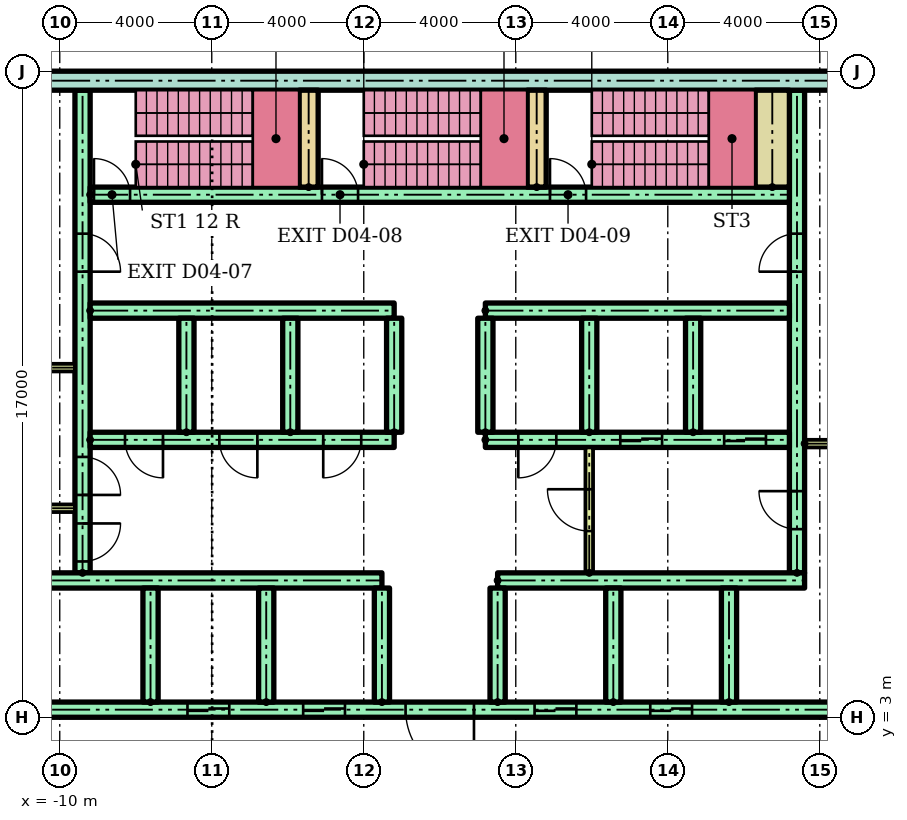
"""IFC4 building model, lengths in metres.
Left out: names, types, materials, properties, quantities, classifications, styles, units other than length and angle.
Written with IfcOpenShell. Run it as: python <this file> out.ifc"""

import sys

from ifc_helpers import new_model, si_unit, direction, frame, frame_2d, origin, place, context, subcontext, project, spatial, rectangle, extrude, element, fill, save


model = new_model("IFC4")
c1 = context("Model", 3, precision=1e-05, world=origin(), true_north=direction((0.0, 1.0)))
c2 = subcontext(c1, "Body", "Model", "MODEL_VIEW")
j1 = project(units=[si_unit("LENGTHUNIT", "METRE"), si_unit("PLANEANGLEUNIT", "RADIAN")], contexts=[c1])
p1 = place(None, origin())
s1 = spatial("IfcSite", under=j1, at=p1, CompositionType="ELEMENT")
p2 = place(p1, origin())
s2 = spatial("IfcBuilding", under=s1, at=p2, CompositionType="ELEMENT")
p3 = place(p2, frame((0.0, 0.0, 18.0)))
s3 = spatial("IfcBuildingStorey", under=s2, at=p3, CompositionType="ELEMENT", Elevation=18.0)
p4 = place(p3, frame((-13.5, 19.75, 0.0)))
e1 = element("IfcWall", 1, at=p4, inside=s3, PredefinedType="SHEAR", context=c2, shape_type="SweptSolid", body=[
    extrude(rectangle(XDim=27.0, YDim=0.5, at=frame_2d((13.5, 0.0))), origin(), (0.0, 0.0, 1.0), 3.7),
])
p5 = place(p3, frame((-9.4, 6.8, 0.0), z_axis=(0.0, 0.0, 1.0), x_axis=(0.0, 1.0, 0.0)))
e2 = element("IfcWall", 2, at=p5, inside=s3, PredefinedType="SHEAR", context=c2, shape_type="SweptSolid", body=[
    extrude(rectangle(XDim=12.7, YDim=0.4, at=frame_2d((6.35, 0.0))), origin(), (0.0, 0.0, 1.0), 3.7),
])
p6 = place(p5, frame((0.3, 0.0, 0.0)))
e3 = element("IfcOpeningElement", 3, at=p6, cuts=e2, PredefinedType="OPENING", context=c2, shape_type="SweptSolid", body=[
    extrude(rectangle(XDim=1.0, YDim=2.1, at=frame_2d((0.5, 1.05))), frame((0.0, 0.21, 0.0), z_axis=(0.0, -1.0, 0.0), x_axis=(1.0, 0.0, 0.0)), (0.0, 0.0, 1.0), 0.42),
])
p7 = place(p5, frame((2.05, 0.0, 0.0)))
e4 = element("IfcOpeningElement", 4, at=p7, cuts=e2, PredefinedType="OPENING", context=c2, shape_type="SweptSolid", body=[
    extrude(rectangle(XDim=1.0, YDim=2.1, at=frame_2d((0.5, 1.05))), frame((0.0, 0.21, 0.0), z_axis=(0.0, -1.0, 0.0), x_axis=(1.0, 0.0, 0.0)), (0.0, 0.0, 1.0), 0.42),
])
p8 = place(p5, frame((7.925, 0.0, 0.0)))
e5 = element("IfcOpeningElement", 5, at=p8, cuts=e2, PredefinedType="OPENING", context=c2, shape_type="SweptSolid", body=[
    extrude(rectangle(XDim=1.0, YDim=2.1, at=frame_2d((0.5, 1.05))), frame((0.0, 0.21, 0.0), z_axis=(0.0, -1.0, 0.0), x_axis=(1.0, 0.0, 0.0)), (0.0, 0.0, 1.0), 0.42),
])
p9 = place(p3, frame((9.4, 6.8, 0.0), z_axis=(0.0, 0.0, 1.0), x_axis=(0.0, 1.0, 0.0)))
e6 = element("IfcWall", 6, at=p9, inside=s3, PredefinedType="SHEAR", context=c2, shape_type="SweptSolid", body=[
    extrude(rectangle(XDim=12.7, YDim=0.4, at=frame_2d((6.35, 0.0))), origin(), (0.0, 0.0, 1.0), 3.7),
])
p10 = place(p9, frame((1.15, 0.0, 0.0)))
e7 = element("IfcOpeningElement", 7, at=p10, cuts=e6, PredefinedType="OPENING", context=c2, shape_type="SweptSolid", body=[
    extrude(rectangle(XDim=1.0, YDim=2.1, at=frame_2d((0.5, 1.05))), frame((0.0, 0.21, 0.0), z_axis=(0.0, -1.0, 0.0), x_axis=(1.0, 0.0, 0.0)), (0.0, 0.0, 1.0), 0.42),
])
p11 = place(p9, frame((7.925, 0.0, 0.0)))
e8 = element("IfcOpeningElement", 8, at=p11, cuts=e6, PredefinedType="OPENING", context=c2, shape_type="SweptSolid", body=[
    extrude(rectangle(XDim=1.0, YDim=2.1, at=frame_2d((0.5, 1.05))), frame((0.0, 0.21, 0.0), z_axis=(0.0, -1.0, 0.0), x_axis=(1.0, 0.0, 0.0)), (0.0, 0.0, 1.0), 0.42),
])
p12 = place(p3, frame((-13.5, 3.2, 0.0)))
e9 = element("IfcWall", 9, at=p12, inside=s3, PredefinedType="SHEAR", context=c2, shape_type="SweptSolid", body=[
    extrude(rectangle(XDim=27.0, YDim=0.4, at=frame_2d((13.5, 0.0))), origin(), (0.0, 0.0, 1.0), 3.7),
])
p13 = place(p12, frame((6.861, 0.0, 0.0)))
e10 = element("IfcOpeningElement", 10, at=p13, cuts=e9, PredefinedType="OPENING", context=c2, shape_type="SweptSolid", body=[
    extrude(rectangle(XDim=1.1, YDim=2.1, at=frame_2d((0.55, 1.05))), frame((0.0, 0.21, 0.0), z_axis=(0.0, -1.0, 0.0), x_axis=(1.0, 0.0, 0.0)), (0.0, 0.0, 1.0), 0.42),
])
p14 = place(p12, frame((9.906, 0.0, 0.0)))
e11 = element("IfcOpeningElement", 11, at=p14, cuts=e9, PredefinedType="OPENING", context=c2, shape_type="SweptSolid", body=[
    extrude(rectangle(XDim=1.1, YDim=2.1, at=frame_2d((0.55, 1.05))), frame((0.0, 0.21, 0.0), z_axis=(0.0, -1.0, 0.0), x_axis=(1.0, 0.0, 0.0)), (0.0, 0.0, 1.0), 0.42),
])
p15 = place(p12, frame((15.994, 0.0, 0.0)))
e12 = element("IfcOpeningElement", 12, at=p15, cuts=e9, PredefinedType="OPENING", context=c2, shape_type="SweptSolid", body=[
    extrude(rectangle(XDim=1.1, YDim=2.1, at=frame_2d((0.55, 1.05))), frame((0.0, 0.21, 0.0), z_axis=(0.0, -1.0, 0.0), x_axis=(1.0, 0.0, 0.0)), (0.0, 0.0, 1.0), 0.42),
])
p16 = place(p12, frame((19.039, 0.0, 0.0)))
e13 = element("IfcOpeningElement", 13, at=p16, cuts=e9, PredefinedType="OPENING", context=c2, shape_type="SweptSolid", body=[
    extrude(rectangle(XDim=1.1, YDim=2.1, at=frame_2d((0.55, 1.05))), frame((0.0, 0.21, 0.0), z_axis=(0.0, -1.0, 0.0), x_axis=(1.0, 0.0, 0.0)), (0.0, 0.0, 1.0), 0.42),
])
p17 = place(p12, frame((12.6, 0.0, 0.0)))
e14 = element("IfcOpeningElement", 14, at=p17, cuts=e9, PredefinedType="OPENING", context=c2, shape_type="SweptSolid", body=[
    extrude(rectangle(XDim=1.8, YDim=2.1, at=frame_2d((0.9, 1.05))), frame((0.0, 0.21, 0.0), z_axis=(0.0, -1.0, 0.0), x_axis=(1.0, 0.0, 0.0)), (0.0, 0.0, 1.0), 0.42),
])
p18 = place(p3, frame((-13.5, 6.6, 0.0)))
e15 = element("IfcWall", 15, at=p18, inside=s3, PredefinedType="SHEAR", context=c2, shape_type="SweptSolid", body=[
    extrude(rectangle(XDim=11.978, YDim=0.4, at=frame_2d((5.989, 0.0))), origin(), (0.0, 0.0, 1.0), 3.7),
])
p19 = place(p3, frame((1.522, 6.6, 0.0)))
e16 = element("IfcWall", 16, at=p19, inside=s3, PredefinedType="SHEAR", context=c2, shape_type="SweptSolid", body=[
    extrude(rectangle(XDim=8.078, YDim=0.4, at=frame_2d((4.039, 0.0))), origin(), (0.0, 0.0, 1.0), 3.7),
])
for number, where, z_axis, x_axis in (
    (17, (-7.611, 3.4, 0.0), (0.0, 0.0, 1.0), (0.0, 1.0, 0.0)),
    (18, (-4.567, 3.4, 0.0), (0.0, 0.0, 1.0), (0.0, 1.0, 0.0)),
    (19, (-1.522, 3.4, 0.0), (0.0, 0.0, 1.0), (0.0, 1.0, 0.0)),
    (20, (1.522, 3.4, 0.0), (0.0, 0.0, 1.0), (0.0, 1.0, 0.0)),
    (21, (4.567, 3.4, 0.0), (0.0, 0.0, 1.0), (0.0, 1.0, 0.0)),
    (22, (7.611, 3.4, 0.0), (0.0, 0.0, 1.0), (0.0, 1.0, 0.0)),
):
    element("IfcWall", number, at=place(p3, frame(where, z_axis=z_axis, x_axis=x_axis)), inside=s3, PredefinedType="SHEAR", context=c2, shape_type="SweptSolid", body=[
        extrude(rectangle(XDim=3.0, YDim=0.4, at=frame_2d((1.5, 0.0))), origin(), (0.0, 0.0, 1.0), 3.7),
    ])
p20 = place(p3, frame((-9.2, 10.3, 0.0)))
e23 = element("IfcWall", 23, at=p20, inside=s3, PredefinedType="SHEAR", context=c2, shape_type="SweptSolid", body=[
    extrude(rectangle(XDim=8.0, YDim=0.4, at=frame_2d((4.0, 0.0))), origin(), (0.0, 0.0, 1.0), 3.7),
])
p21 = place(p20, frame((0.917, 0.0, 0.0)))
e24 = element("IfcOpeningElement", 24, at=p21, cuts=e23, PredefinedType="OPENING", context=c2, shape_type="SweptSolid", body=[
    extrude(rectangle(XDim=1.0, YDim=2.1, at=frame_2d((0.5, 1.05))), frame((0.0, 0.21, 0.0), z_axis=(0.0, -1.0, 0.0), x_axis=(1.0, 0.0, 0.0)), (0.0, 0.0, 1.0), 0.42),
])
p22 = place(p20, frame((3.4, 0.0, 0.0)))
e25 = element("IfcOpeningElement", 25, at=p22, cuts=e23, PredefinedType="OPENING", context=c2, shape_type="SweptSolid", body=[
    extrude(rectangle(XDim=1.0, YDim=2.1, at=frame_2d((0.5, 1.05))), frame((0.0, 0.21, 0.0), z_axis=(0.0, -1.0, 0.0), x_axis=(1.0, 0.0, 0.0)), (0.0, 0.0, 1.0), 0.42),
])
p23 = place(p20, frame((6.133, 0.0, 0.0)))
e26 = element("IfcOpeningElement", 26, at=p23, cuts=e23, PredefinedType="OPENING", context=c2, shape_type="SweptSolid", body=[
    extrude(rectangle(XDim=1.0, YDim=2.1, at=frame_2d((0.5, 1.05))), frame((0.0, 0.21, 0.0), z_axis=(0.0, -1.0, 0.0), x_axis=(1.0, 0.0, 0.0)), (0.0, 0.0, 1.0), 0.42),
])
p24 = place(p3, frame((-9.2, 13.7, 0.0)))
e27 = element("IfcWall", 27, at=p24, inside=s3, PredefinedType="SHEAR", context=c2, shape_type="SweptSolid", body=[
    extrude(rectangle(XDim=8.0, YDim=0.4, at=frame_2d((4.0, 0.0))), origin(), (0.0, 0.0, 1.0), 3.7),
])
p25 = place(p3, frame((1.2, 10.3, 0.0)))
e28 = element("IfcWall", 28, at=p25, inside=s3, PredefinedType="SHEAR", context=c2, shape_type="SweptSolid", body=[
    extrude(rectangle(XDim=8.0, YDim=0.4, at=frame_2d((4.0, 0.0))), origin(), (0.0, 0.0, 1.0), 3.7),
])
p26 = place(p25, frame((3.55, 0.0, 0.0)))
e29 = element("IfcOpeningElement", 29, at=p26, cuts=e28, PredefinedType="OPENING", context=c2, shape_type="SweptSolid", body=[
    extrude(rectangle(XDim=1.1, YDim=2.1, at=frame_2d((0.55, 1.05))), frame((0.0, 0.21, 0.0), z_axis=(0.0, -1.0, 0.0), x_axis=(1.0, 0.0, 0.0)), (0.0, 0.0, 1.0), 0.42),
])
p27 = place(p25, frame((6.283, 0.0, 0.0)))
e30 = element("IfcOpeningElement", 30, at=p27, cuts=e28, PredefinedType="OPENING", context=c2, shape_type="SweptSolid", body=[
    extrude(rectangle(XDim=1.1, YDim=2.1, at=frame_2d((0.55, 1.05))), frame((0.0, 0.21, 0.0), z_axis=(0.0, -1.0, 0.0), x_axis=(1.0, 0.0, 0.0)), (0.0, 0.0, 1.0), 0.42),
])
p28 = place(p25, frame((0.867, 0.0, 0.0)))
e31 = element("IfcOpeningElement", 31, at=p28, cuts=e28, PredefinedType="OPENING", context=c2, shape_type="SweptSolid", body=[
    extrude(rectangle(XDim=1.0, YDim=2.1, at=frame_2d((0.5, 1.05))), frame((0.0, 0.21, 0.0), z_axis=(0.0, -1.0, 0.0), x_axis=(1.0, 0.0, 0.0)), (0.0, 0.0, 1.0), 0.42),
])
p29 = place(p3, frame((1.2, 13.7, 0.0)))
e32 = element("IfcWall", 32, at=p29, inside=s3, PredefinedType="SHEAR", context=c2, shape_type="SweptSolid", body=[
    extrude(rectangle(XDim=8.0, YDim=0.4, at=frame_2d((4.0, 0.0))), origin(), (0.0, 0.0, 1.0), 3.7),
])
for number, where, z_axis, x_axis in (
    (33, (-6.667, 10.5, 0.0), (0.0, 0.0, 1.0), (0.0, 1.0, 0.0)),
    (34, (-3.933, 10.5, 0.0), (0.0, 0.0, 1.0), (0.0, 1.0, 0.0)),
    (35, (-1.2, 10.5, 0.0), (0.0, 0.0, 1.0), (0.0, 1.0, 0.0)),
    (36, (1.2, 10.5, 0.0), (0.0, 0.0, 1.0), (0.0, 1.0, 0.0)),
    (37, (3.933, 10.5, 0.0), (0.0, 0.0, 1.0), (0.0, 1.0, 0.0)),
    (38, (6.667, 10.5, 0.0), (0.0, 0.0, 1.0), (0.0, 1.0, 0.0)),
):
    element("IfcWall", number, at=place(p3, frame(where, z_axis=z_axis, x_axis=x_axis)), inside=s3, PredefinedType="SHEAR", context=c2, shape_type="SweptSolid", body=[
        extrude(rectangle(XDim=3.0, YDim=0.4, at=frame_2d((1.5, 0.0))), origin(), (0.0, 0.0, 1.0), 3.7),
    ])
p30 = place(p3, frame((3.933, 6.8, 0.0), z_axis=(0.0, 0.0, 1.0), x_axis=(0.0, 1.0, 0.0)))
e39 = element("IfcWall", 39, at=p30, inside=s3, PredefinedType="PARTITIONING", context=c2, shape_type="SweptSolid", body=[
    extrude(rectangle(XDim=3.3, YDim=0.2, at=frame_2d((1.65, 0.0))), origin(), (0.0, 0.0, 1.0), 3.7),
])
p31 = place(p30, frame((1.1, 0.0, 0.0)))
e40 = element("IfcOpeningElement", 40, at=p31, cuts=e39, PredefinedType="OPENING", context=c2, shape_type="SweptSolid", body=[
    extrude(rectangle(XDim=1.1, YDim=2.1, at=frame_2d((0.55, 1.05))), frame((0.0, 0.11, 0.0), z_axis=(0.0, -1.0, 0.0), x_axis=(1.0, 0.0, 0.0)), (0.0, 0.0, 1.0), 0.22),
])
p32 = place(p3, frame((-9.2, 16.75, 0.0)))
e41 = element("IfcWall", 41, at=p32, inside=s3, PredefinedType="SHEAR", context=c2, shape_type="SweptSolid", body=[
    extrude(rectangle(XDim=18.4, YDim=0.4, at=frame_2d((9.2, 0.0))), origin(), (0.0, 0.0, 1.0), 3.7),
])
p33 = place(p32, frame((0.1, 0.0, 0.0)))
e42 = element("IfcOpeningElement", 42, at=p33, cuts=e41, PredefinedType="OPENING", context=c2, shape_type="SweptSolid", body=[
    extrude(rectangle(XDim=0.95, YDim=2.1, at=frame_2d((0.475, 1.05))), frame((0.0, 0.21, 0.0), z_axis=(0.0, -1.0, 0.0), x_axis=(1.0, 0.0, 0.0)), (0.0, 0.0, 1.0), 0.42),
])
p34 = place(p32, frame((6.1, 0.0, 0.0)))
e43 = element("IfcOpeningElement", 43, at=p34, cuts=e41, PredefinedType="OPENING", context=c2, shape_type="SweptSolid", body=[
    extrude(rectangle(XDim=0.95, YDim=2.1, at=frame_2d((0.475, 1.05))), frame((0.0, 0.21, 0.0), z_axis=(0.0, -1.0, 0.0), x_axis=(1.0, 0.0, 0.0)), (0.0, 0.0, 1.0), 0.42),
])
p35 = place(p32, frame((12.1, 0.0, 0.0)))
e44 = element("IfcOpeningElement", 44, at=p35, cuts=e41, PredefinedType="OPENING", context=c2, shape_type="SweptSolid", body=[
    extrude(rectangle(XDim=0.95, YDim=2.1, at=frame_2d((0.475, 1.05))), frame((0.0, 0.21, 0.0), z_axis=(0.0, -1.0, 0.0), x_axis=(1.0, 0.0, 0.0)), (0.0, 0.0, 1.0), 0.42),
])
for number, where, z_axis, x_axis in (
    (45, (-3.45, 16.95, 0.0), (0.0, 0.0, 1.0), (0.0, 1.0, 0.0)),
    (46, (2.55, 16.95, 0.0), (0.0, 0.0, 1.0), (0.0, 1.0, 0.0)),
):
    element("IfcWall", number, at=place(p3, frame(where, z_axis=z_axis, x_axis=x_axis)), inside=s3, PredefinedType="SHEAR", context=c2, shape_type="SweptSolid", body=[
        extrude(rectangle(XDim=2.55, YDim=0.5, at=frame_2d((1.275, 0.0))), origin(), (0.0, 0.0, 1.0), 3.7),
    ])
p36 = place(p3, frame((8.75, 16.95, 0.0), z_axis=(0.0, 0.0, 1.0), x_axis=(0.0, 1.0, 0.0)))
e47 = element("IfcWall", 47, at=p36, inside=s3, PredefinedType="SHEAR", context=c2, shape_type="SweptSolid", body=[
    extrude(rectangle(XDim=2.55, YDim=0.9, at=frame_2d((1.275, 0.0))), origin(), (0.0, 0.0, 1.0), 3.7),
])
for number, where in (
    (48, (-13.5, 8.5, 0.0)),
    (49, (-13.5, 12.2, 0.0)),
    (50, (9.6, 10.2, 0.0)),
):
    element("IfcWall", number, at=place(p3, frame(where)), inside=s3, PredefinedType="PARTITIONING", context=c2, shape_type="SweptSolid", body=[
        extrude(rectangle(XDim=3.9, YDim=0.2, at=frame_2d((1.95, 0.0))), origin(), (0.0, 0.0, 1.0), 3.7),
    ])
p37 = place(p13, origin())
e51 = element("IfcDoor", 51, at=p37, inside=s3, OperationType="SLIDING_TO_LEFT", PredefinedType="DOOR", context=c2, shape_type="SweptSolid", body=[
    extrude(rectangle(XDim=1.1, YDim=2.1, at=frame_2d((0.55, 1.05))), frame((0.0, 0.025, 0.0), z_axis=(0.0, -1.0, 0.0), x_axis=(1.0, 0.0, 0.0)), (0.0, 0.0, 1.0), 0.05),
])
fill(e10, e51)
p38 = place(p14, origin())
e52 = element("IfcDoor", 52, at=p38, inside=s3, OperationType="SLIDING_TO_LEFT", PredefinedType="DOOR", context=c2, shape_type="SweptSolid", body=[
    extrude(rectangle(XDim=1.1, YDim=2.1, at=frame_2d((0.55, 1.05))), frame((0.0, 0.025, 0.0), z_axis=(0.0, -1.0, 0.0), x_axis=(1.0, 0.0, 0.0)), (0.0, 0.0, 1.0), 0.05),
])
fill(e11, e52)
p39 = place(p15, origin())
e53 = element("IfcDoor", 53, at=p39, inside=s3, OperationType="SLIDING_TO_LEFT", PredefinedType="DOOR", context=c2, shape_type="SweptSolid", body=[
    extrude(rectangle(XDim=1.1, YDim=2.1, at=frame_2d((0.55, 1.05))), frame((0.0, 0.025, 0.0), z_axis=(0.0, -1.0, 0.0), x_axis=(1.0, 0.0, 0.0)), (0.0, 0.0, 1.0), 0.05),
])
fill(e12, e53)
p40 = place(p16, origin())
e54 = element("IfcDoor", 54, at=p40, inside=s3, OperationType="SLIDING_TO_LEFT", PredefinedType="DOOR", context=c2, shape_type="SweptSolid", body=[
    extrude(rectangle(XDim=1.1, YDim=2.1, at=frame_2d((0.55, 1.05))), frame((0.0, 0.025, 0.0), z_axis=(0.0, -1.0, 0.0), x_axis=(1.0, 0.0, 0.0)), (0.0, 0.0, 1.0), 0.05),
])
fill(e13, e54)
p41 = place(p17, frame((1.8, 0.0, 0.0), z_axis=(0.0, 0.0, 1.0), x_axis=(-1.0, 0.0, 0.0)))
e55 = element("IfcDoor", 55, at=p41, inside=s3, OperationType="DOUBLE_DOOR_SINGLE_SWING", PredefinedType="DOOR", context=c2, shape_type="SweptSolid", body=[
    extrude(rectangle(XDim=1.8, YDim=2.1, at=frame_2d((0.9, 1.05))), frame((0.0, 0.025, 0.0), z_axis=(0.0, -1.0, 0.0), x_axis=(1.0, 0.0, 0.0)), (0.0, 0.0, 1.0), 0.05),
])
fill(e14, e55)
p42 = place(p26, origin())
e56 = element("IfcDoor", 56, at=p42, inside=s3, OperationType="SLIDING_TO_LEFT", PredefinedType="DOOR", context=c2, shape_type="SweptSolid", body=[
    extrude(rectangle(XDim=1.1, YDim=2.1, at=frame_2d((0.55, 1.05))), frame((0.0, 0.025, 0.0), z_axis=(0.0, -1.0, 0.0), x_axis=(1.0, 0.0, 0.0)), (0.0, 0.0, 1.0), 0.05),
])
fill(e29, e56)
p43 = place(p27, origin())
e57 = element("IfcDoor", 57, at=p43, inside=s3, OperationType="SLIDING_TO_LEFT", PredefinedType="DOOR", context=c2, shape_type="SweptSolid", body=[
    extrude(rectangle(XDim=1.1, YDim=2.1, at=frame_2d((0.55, 1.05))), frame((0.0, 0.025, 0.0), z_axis=(0.0, -1.0, 0.0), x_axis=(1.0, 0.0, 0.0)), (0.0, 0.0, 1.0), 0.05),
])
fill(e30, e57)
p44 = place(p21, frame((1.0, 0.0, 0.0), z_axis=(0.0, 0.0, 1.0), x_axis=(-1.0, 0.0, 0.0)))
e58 = element("IfcDoor", 58, at=p44, inside=s3, OperationType="SINGLE_SWING_RIGHT", PredefinedType="DOOR", context=c2, shape_type="SweptSolid", body=[
    extrude(rectangle(XDim=1.0, YDim=2.1, at=frame_2d((0.5, 1.05))), frame((0.0, 0.025, 0.0), z_axis=(0.0, -1.0, 0.0), x_axis=(1.0, 0.0, 0.0)), (0.0, 0.0, 1.0), 0.05),
])
fill(e24, e58)
p45 = place(p22, frame((1.0, 0.0, 0.0), z_axis=(0.0, 0.0, 1.0), x_axis=(-1.0, 0.0, 0.0)))
e59 = element("IfcDoor", 59, at=p45, inside=s3, OperationType="SINGLE_SWING_RIGHT", PredefinedType="DOOR", context=c2, shape_type="SweptSolid", body=[
    extrude(rectangle(XDim=1.0, YDim=2.1, at=frame_2d((0.5, 1.05))), frame((0.0, 0.025, 0.0), z_axis=(0.0, -1.0, 0.0), x_axis=(1.0, 0.0, 0.0)), (0.0, 0.0, 1.0), 0.05),
])
fill(e25, e59)
p46 = place(p23, frame((1.0, 0.0, 0.0), z_axis=(0.0, 0.0, 1.0), x_axis=(-1.0, 0.0, 0.0)))
e60 = element("IfcDoor", 60, at=p46, inside=s3, OperationType="SINGLE_SWING_LEFT", PredefinedType="DOOR", context=c2, shape_type="SweptSolid", body=[
    extrude(rectangle(XDim=1.0, YDim=2.1, at=frame_2d((0.5, 1.05))), frame((0.0, 0.025, 0.0), z_axis=(0.0, -1.0, 0.0), x_axis=(1.0, 0.0, 0.0)), (0.0, 0.0, 1.0), 0.05),
])
fill(e26, e60)
p47 = place(p28, frame((1.0, 0.0, 0.0), z_axis=(0.0, 0.0, 1.0), x_axis=(-1.0, 0.0, 0.0)))
e61 = element("IfcDoor", 61, at=p47, inside=s3, OperationType="SINGLE_SWING_LEFT", PredefinedType="DOOR", context=c2, shape_type="SweptSolid", body=[
    extrude(rectangle(XDim=1.0, YDim=2.1, at=frame_2d((0.5, 1.05))), frame((0.0, 0.025, 0.0), z_axis=(0.0, -1.0, 0.0), x_axis=(1.0, 0.0, 0.0)), (0.0, 0.0, 1.0), 0.05),
])
fill(e31, e61)
p48 = place(p31, origin())
e62 = element("IfcDoor", 62, at=p48, inside=s3, OperationType="SINGLE_SWING_RIGHT", PredefinedType="DOOR", context=c2, shape_type="SweptSolid", body=[
    extrude(rectangle(XDim=1.1, YDim=2.1, at=frame_2d((0.55, 1.05))), frame((0.0, 0.025, 0.0), z_axis=(0.0, -1.0, 0.0), x_axis=(1.0, 0.0, 0.0)), (0.0, 0.0, 1.0), 0.05),
])
fill(e40, e62)
p49 = place(p33, origin())
e63 = element("IfcDoor", 63, at=p49, inside=s3, OperationType="SINGLE_SWING_LEFT", PredefinedType="DOOR", context=c2, shape_type="SweptSolid", body=[
    extrude(rectangle(XDim=0.95, YDim=2.1, at=frame_2d((0.475, 1.05))), frame((0.0, 0.025, 0.0), z_axis=(0.0, -1.0, 0.0), x_axis=(1.0, 0.0, 0.0)), (0.0, 0.0, 1.0), 0.05),
])
fill(e42, e63)
p50 = place(p34, origin())
e64 = element("IfcDoor", 64, at=p50, inside=s3, OperationType="SINGLE_SWING_LEFT", PredefinedType="DOOR", context=c2, shape_type="SweptSolid", body=[
    extrude(rectangle(XDim=0.95, YDim=2.1, at=frame_2d((0.475, 1.05))), frame((0.0, 0.025, 0.0), z_axis=(0.0, -1.0, 0.0), x_axis=(1.0, 0.0, 0.0)), (0.0, 0.0, 1.0), 0.05),
])
fill(e43, e64)
p51 = place(p35, origin())
e65 = element("IfcDoor", 65, at=p51, inside=s3, OperationType="SINGLE_SWING_LEFT", PredefinedType="DOOR", context=c2, shape_type="SweptSolid", body=[
    extrude(rectangle(XDim=0.95, YDim=2.1, at=frame_2d((0.475, 1.05))), frame((0.0, 0.025, 0.0), z_axis=(0.0, -1.0, 0.0), x_axis=(1.0, 0.0, 0.0)), (0.0, 0.0, 1.0), 0.05),
])
fill(e44, e65)
p52 = place(p6, frame((1.0, 0.0, 0.0), z_axis=(0.0, 0.0, 1.0), x_axis=(-1.0, 0.0, 0.0)))
e66 = element("IfcDoor", 66, at=p52, inside=s3, OperationType="SINGLE_SWING_RIGHT", PredefinedType="DOOR", context=c2, shape_type="SweptSolid", body=[
    extrude(rectangle(XDim=1.0, YDim=2.1, at=frame_2d((0.5, 1.05))), frame((0.0, 0.025, 0.0), z_axis=(0.0, -1.0, 0.0), x_axis=(1.0, 0.0, 0.0)), (0.0, 0.0, 1.0), 0.05),
])
fill(e3, e66)
p53 = place(p7, frame((1.0, 0.0, 0.0), z_axis=(0.0, 0.0, 1.0), x_axis=(-1.0, 0.0, 0.0)))
e67 = element("IfcDoor", 67, at=p53, inside=s3, OperationType="SINGLE_SWING_LEFT", PredefinedType="DOOR", context=c2, shape_type="SweptSolid", body=[
    extrude(rectangle(XDim=1.0, YDim=2.1, at=frame_2d((0.5, 1.05))), frame((0.0, 0.025, 0.0), z_axis=(0.0, -1.0, 0.0), x_axis=(1.0, 0.0, 0.0)), (0.0, 0.0, 1.0), 0.05),
])
fill(e4, e67)
p54 = place(p8, frame((1.0, 0.0, 0.0), z_axis=(0.0, 0.0, 1.0), x_axis=(-1.0, 0.0, 0.0)))
e68 = element("IfcDoor", 68, at=p54, inside=s3, OperationType="SINGLE_SWING_LEFT", PredefinedType="DOOR", context=c2, shape_type="SweptSolid", body=[
    extrude(rectangle(XDim=1.0, YDim=2.1, at=frame_2d((0.5, 1.05))), frame((0.0, 0.025, 0.0), z_axis=(0.0, -1.0, 0.0), x_axis=(1.0, 0.0, 0.0)), (0.0, 0.0, 1.0), 0.05),
])
fill(e5, e68)
p55 = place(p10, origin())
e69 = element("IfcDoor", 69, at=p55, inside=s3, OperationType="SINGLE_SWING_RIGHT", PredefinedType="DOOR", context=c2, shape_type="SweptSolid", body=[
    extrude(rectangle(XDim=1.0, YDim=2.1, at=frame_2d((0.5, 1.05))), frame((0.0, 0.025, 0.0), z_axis=(0.0, -1.0, 0.0), x_axis=(1.0, 0.0, 0.0)), (0.0, 0.0, 1.0), 0.05),
])
fill(e7, e69)
p56 = place(p11, origin())
e70 = element("IfcDoor", 70, at=p56, inside=s3, OperationType="SINGLE_SWING_LEFT", PredefinedType="DOOR", context=c2, shape_type="SweptSolid", body=[
    extrude(rectangle(XDim=1.0, YDim=2.1, at=frame_2d((0.5, 1.05))), frame((0.0, 0.025, 0.0), z_axis=(0.0, -1.0, 0.0), x_axis=(1.0, 0.0, 0.0)), (0.0, 0.0, 1.0), 0.05),
])
fill(e8, e70)
save(model, sys.argv[1])
